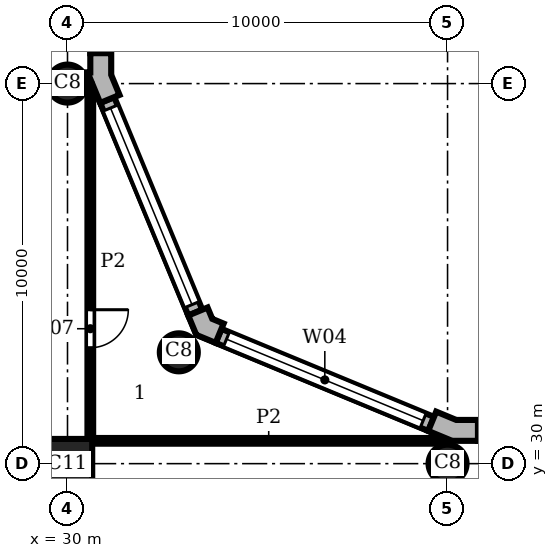
"""IFC4 building model, lengths in metres.
Left out: names, types, materials, properties, quantities, classifications, styles, units other than length and angle.
Written with IfcOpenShell. Run it as: python <this file> out.ifc"""

import sys

from ifc_helpers import new_model, si_unit, direction, frame, frame_2d, origin, origin_2d, place, context, subcontext, project, spatial, polyline, rectangle, circle, outline, extrude, element, fill, save


model = new_model("IFC4")
c1 = context("Model", 3, precision=1e-05, world=origin(), true_north=direction((0.0, 1.0)))
c2 = subcontext(c1, "Body", "Model", "MODEL_VIEW")
j1 = project(units=[si_unit("LENGTHUNIT", "METRE"), si_unit("PLANEANGLEUNIT", "RADIAN")], contexts=[c1])
p1 = place(None, origin())
s1 = spatial("IfcSite", under=j1, at=p1, CompositionType="ELEMENT")
p2 = place(p1, origin())
s2 = spatial("IfcBuilding", under=s1, at=p2, CompositionType="ELEMENT")
p3 = place(p2, frame((0.0, 0.0, 213.6)))
s3 = spatial("IfcBuildingStorey", under=s2, at=p3, CompositionType="ELEMENT", Elevation=213.6)
for number, where, z_axis, x_axis in (
    (1, (40.0, 30.0, 0.0), (0.0, 0.0, 1.0), (1.0, 0.0, 0.0)),
    (2, (32.929, 32.929, 0.0), (0.0, 0.0, 1.0), (1.0, 0.0, 0.0)),
    (3, (30.0, 40.0, 0.0), (0.0, 0.0, 1.0), (1.0, 0.0, 0.0)),
):
    element("IfcColumn", number, at=place(p3, frame(where, z_axis=z_axis, x_axis=x_axis)), inside=s3, PredefinedType="COLUMN", context=c2, shape_type="SweptSolid", body=[
        extrude(circle(Radius=0.5, at=origin_2d()), origin(), (0.0, 0.0, 1.0), 3.9),
    ])
p4 = place(p3, frame((30.0, 30.0, 0.0), z_axis=(0.0, 0.0, 1.0), x_axis=(1.0, 0.0, 0.0)))
e4 = element("IfcColumn", 4, at=p4, inside=s3, PredefinedType="COLUMN", context=c2, shape_type="SweptSolid", body=[
    extrude(rectangle(XDim=1.3, YDim=1.3, at=origin_2d()), origin(), (0.0, 0.0, 1.0), 3.9),
])
p5 = place(p3, origin())
e5 = element("IfcWall", 5, at=p5, inside=s3, PredefinedType="SOLIDWALL", context=c2, shape_type="SweptSolid", body=[
    extrude(outline(polyline([(40.8, 31.0), (40.8, 31.15), (40.229, 31.15), (39.701, 31.369), (39.644, 31.23), (39.49, 30.861), (40.119, 30.6), (40.8, 30.6), (40.8, 31.0)])), origin(), (0.0, 0.0, 1.0), 3.9),
])
e6 = element("IfcWall", 6, at=p5, inside=s3, PredefinedType="SOLIDWALL", context=c2, shape_type="SweptSolid", body=[
    extrude(outline(polyline([(34.051, 33.547), (34.108, 33.685), (33.809, 33.809), (33.685, 34.108), (33.547, 34.051), (33.177, 33.898), (33.388, 33.388), (33.898, 33.177), (34.051, 33.547)])), origin(), (0.0, 0.0, 1.0), 3.9),
])
e7 = element("IfcWall", 7, at=p5, inside=s3, PredefinedType="SOLIDWALL", context=c2, shape_type="SweptSolid", body=[
    extrude(outline(polyline([(30.62, 39.995), (30.62, 40.071), (30.861, 39.49), (31.23, 39.644), (31.369, 39.701), (31.15, 40.229), (31.15, 40.8), (31.0, 40.8), (30.6, 40.8), (30.6, 40.295), (30.5, 40.295), (30.5, 39.995), (30.62, 39.995)])), origin(), (0.0, 0.0, 1.0), 3.9),
])
p6 = place(p3, frame((59.2, 30.8, 0.0), z_axis=(0.0, 0.0, 1.0), x_axis=(-1.0, 0.0, 0.0)))
e8 = element("IfcWall", 8, at=p6, inside=s3, PredefinedType="SOLIDWALL", context=c2, shape_type="SweptSolid", body=[
    extrude(rectangle(XDim=18.4, YDim=0.4, at=frame_2d((9.2, 0.0))), origin(), (0.0, 0.0, 1.0), 3.9),
])
p7 = place(p6, frame((0.2, 0.0, 0.9)))
e9 = element("IfcOpeningElement", 9, at=p7, cuts=e8, PredefinedType="OPENING", context=c2, shape_type="SweptSolid", body=[
    extrude(rectangle(XDim=8.0, YDim=2.35, at=frame_2d((4.0, 1.175))), frame((0.0, 0.21, 0.0), z_axis=(0.0, -1.0, 0.0), x_axis=(1.0, 0.0, 0.0)), (0.0, 0.0, 1.0), 0.42),
])
p8 = place(p6, frame((10.2, 0.0, 0.9)))
e10 = element("IfcOpeningElement", 10, at=p8, cuts=e8, PredefinedType="OPENING", context=c2, shape_type="SweptSolid", body=[
    extrude(rectangle(XDim=8.0, YDim=2.35, at=frame_2d((4.0, 1.175))), frame((0.0, 0.21, 0.0), z_axis=(0.0, -1.0, 0.0), x_axis=(1.0, 0.0, 0.0)), (0.0, 0.0, 1.0), 0.42),
])
p9 = place(p3, frame((39.567, 31.045, 0.0), z_axis=(0.0, 0.0, 1.0), x_axis=(-0.923891000409, 0.382655745237, 0.0)))
e11 = element("IfcWall", 11, at=p9, inside=s3, PredefinedType="SOLIDWALL", context=c2, shape_type="SweptSolid", body=[
    extrude(rectangle(XDim=6.053, YDim=0.4, at=frame_2d((3.027, 0.0))), origin(), (0.0, 0.0, 1.0), 3.9),
])
p10 = place(p9, frame((0.227, 0.0, 0.9)))
e12 = element("IfcOpeningElement", 12, at=p10, cuts=e11, PredefinedType="OPENING", context=c2, shape_type="SweptSolid", body=[
    extrude(rectangle(XDim=5.6, YDim=2.35, at=frame_2d((2.8, 1.175))), frame((0.0, 0.21, 0.0), z_axis=(0.0, -1.0, 0.0), x_axis=(1.0, 0.0, 0.0)), (0.0, 0.0, 1.0), 0.42),
])
p11 = place(p3, frame((33.362, 33.974, 0.0), z_axis=(0.0, 0.0, 1.0), x_axis=(-0.382655745237, 0.923891000409, 0.0)))
e13 = element("IfcWall", 13, at=p11, inside=s3, PredefinedType="SOLIDWALL", context=c2, shape_type="SweptSolid", body=[
    extrude(rectangle(XDim=6.053, YDim=0.4, at=frame_2d((3.027, 0.0))), origin(), (0.0, 0.0, 1.0), 3.9),
])
p12 = place(p11, frame((0.227, 0.0, 0.9)))
e14 = element("IfcOpeningElement", 14, at=p12, cuts=e13, PredefinedType="OPENING", context=c2, shape_type="SweptSolid", body=[
    extrude(rectangle(XDim=5.6, YDim=2.35, at=frame_2d((2.8, 1.175))), frame((0.0, 0.21, 0.0), z_axis=(0.0, -1.0, 0.0), x_axis=(1.0, 0.0, 0.0)), (0.0, 0.0, 1.0), 0.42),
])
p13 = place(p3, frame((30.8, 40.8, 0.0), z_axis=(0.0, 0.0, 1.0), x_axis=(0.0, 1.0, 0.0)))
e15 = element("IfcWall", 15, at=p13, inside=s3, PredefinedType="SOLIDWALL", context=c2, shape_type="SweptSolid", body=[
    extrude(rectangle(XDim=18.4, YDim=0.4, at=frame_2d((9.2, 0.0))), origin(), (0.0, 0.0, 1.0), 3.9),
])
p14 = place(p13, frame((0.2, 0.0, 0.9)))
e16 = element("IfcOpeningElement", 16, at=p14, cuts=e15, PredefinedType="OPENING", context=c2, shape_type="SweptSolid", body=[
    extrude(rectangle(XDim=8.0, YDim=2.35, at=frame_2d((4.0, 1.175))), frame((0.0, 0.21, 0.0), z_axis=(0.0, -1.0, 0.0), x_axis=(1.0, 0.0, 0.0)), (0.0, 0.0, 1.0), 0.42),
])
p15 = place(p13, frame((10.2, 0.0, 0.9)))
e17 = element("IfcOpeningElement", 17, at=p15, cuts=e15, PredefinedType="OPENING", context=c2, shape_type="SweptSolid", body=[
    extrude(rectangle(XDim=8.0, YDim=2.35, at=frame_2d((4.0, 1.175))), frame((0.0, 0.21, 0.0), z_axis=(0.0, -1.0, 0.0), x_axis=(1.0, 0.0, 0.0)), (0.0, 0.0, 1.0), 0.42),
])
p16 = place(p3, frame((30.6, 30.65, 0.0), z_axis=(0.0, 0.0, 1.0), x_axis=(0.0, 1.0, 0.0)))
e18 = element("IfcWall", 18, at=p16, inside=s3, PredefinedType="PARTITIONING", context=c2, shape_type="SweptSolid", body=[
    extrude(rectangle(XDim=9.288, YDim=0.15, at=frame_2d((4.644, 0.0))), origin(), (0.0, 0.0, 1.0), 3.58),
])
p17 = place(p16, frame((2.4, 0.0, 0.0)))
e19 = element("IfcOpeningElement", 19, at=p17, cuts=e18, PredefinedType="OPENING", context=c2, shape_type="SweptSolid", body=[
    extrude(rectangle(XDim=1.0, YDim=2.1, at=frame_2d((0.5, 1.05))), frame((0.0, 0.085, 0.0), z_axis=(0.0, -1.0, 0.0), x_axis=(1.0, 0.0, 0.0)), (0.0, 0.0, 1.0), 0.17),
])
p18 = place(p3, frame((30.65, 30.6, 0.0), z_axis=(0.0, 0.0, 1.0), x_axis=(1.0, 0.0, 0.0)))
e20 = element("IfcWall", 20, at=p18, inside=s3, PredefinedType="PARTITIONING", context=c2, shape_type="SweptSolid", body=[
    extrude(rectangle(XDim=9.288, YDim=0.15, at=frame_2d((4.644, 0.0))), origin(), (0.0, 0.0, 1.0), 3.58),
])
p19 = place(p10, origin())
e21 = element("IfcWindow", 21, at=p19, inside=s3, PartitioningType="SINGLE_PANEL", PredefinedType="WINDOW", context=c2, shape_type="SweptSolid", body=[
    extrude(rectangle(XDim=5.6, YDim=2.35, at=frame_2d((2.8, 1.175))), frame((0.0, 0.16, 0.0), z_axis=(0.0, -1.0, 0.0), x_axis=(1.0, 0.0, 0.0)), (0.0, 0.0, 1.0), 0.06),
])
fill(e12, e21)
p20 = place(p12, origin())
e22 = element("IfcWindow", 22, at=p20, inside=s3, PartitioningType="SINGLE_PANEL", PredefinedType="WINDOW", context=c2, shape_type="SweptSolid", body=[
    extrude(rectangle(XDim=5.6, YDim=2.35, at=frame_2d((2.8, 1.175))), frame((0.0, 0.16, 0.0), z_axis=(0.0, -1.0, 0.0), x_axis=(1.0, 0.0, 0.0)), (0.0, 0.0, 1.0), 0.06),
])
fill(e14, e22)
p21 = place(p17, frame((1.0, 0.0, 0.0), z_axis=(0.0, 0.0, 1.0), x_axis=(-1.0, 0.0, 0.0)))
e23 = element("IfcDoor", 23, at=p21, inside=s3, OperationType="SINGLE_SWING_LEFT", PredefinedType="DOOR", context=c2, shape_type="SweptSolid", body=[
    extrude(rectangle(XDim=1.0, YDim=2.1, at=frame_2d((0.5, 1.05))), frame((0.0, 0.025, 0.0), z_axis=(0.0, -1.0, 0.0), x_axis=(1.0, 0.0, 0.0)), (0.0, 0.0, 1.0), 0.05),
])
fill(e19, e23)
save(model, sys.argv[1])
